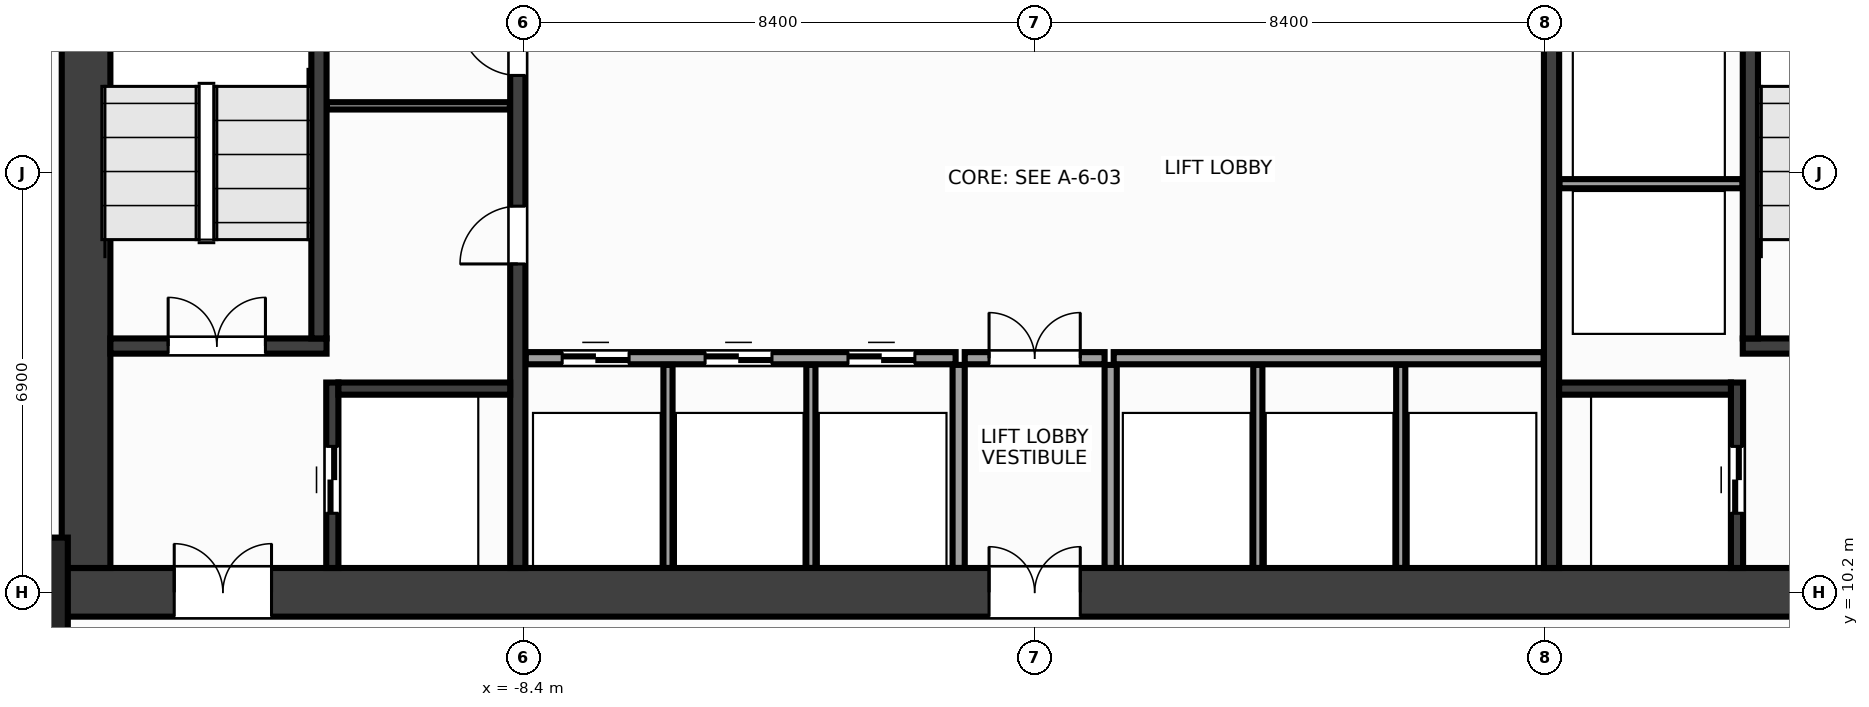
"""IFC4 building model, lengths in metres.
Left out: names, types, materials, properties, quantities, classifications, styles, units other than length and angle.
Written with IfcOpenShell. Run it as: python <this file> out.ifc"""

import sys

from ifc_helpers import new_model, si_unit, direction, frame, frame_2d, origin, origin_2d, place, context, subcontext, project, spatial, rectangle, extrude, source, transform, mapped, element, fill, save


model = new_model("IFC4")
c1 = context("Model", 3, precision=1e-05, world=origin(), true_north=direction((0.0, 1.0)))
c2 = subcontext(c1, "Body", "Model", "MODEL_VIEW")
j1 = project(units=[si_unit("LENGTHUNIT", "METRE"), si_unit("PLANEANGLEUNIT", "RADIAN")], contexts=[c1])
p1 = place(None, origin())
s1 = spatial("IfcSite", under=j1, at=p1, CompositionType="ELEMENT")
p2 = place(p1, origin())
s2 = spatial("IfcBuilding", under=s1, at=p2, CompositionType="ELEMENT")
p3 = place(p2, frame((0.0, 0.0, 56.0)))
s3 = spatial("IfcBuildingStorey", under=s2, at=p3, CompositionType="ELEMENT", Elevation=56.0)
m1 = source(origin(), c2, "Body", "SweptSolid", [
    extrude(rectangle(XDim=32.0, YDim=0.8, at=frame_2d((16.0, 0.0))), origin(), (0.0, 0.0, 1.0), 3.6),
])
p4 = place(p3, frame((-16.0, 10.2, 0.0), z_axis=(0.0, 0.0, 1.0), x_axis=(1.0, 0.0, 0.0)))
e1 = element("IfcWall", 1, at=p4, inside=s3, PredefinedType="SHEAR", context=c2, shape_type="MappedRepresentation", body=[
    mapped(m1, transform((0.0, 0.0, 0.0), x_axis=(1.0, 0.0, 0.0), y_axis=(0.0, 1.0, 0.0), z_axis=(0.0, 0.0, 1.0), scale=1.0)),
])
p5 = place(p4, frame((1.85, 0.0, 0.0)))
e2 = element("IfcOpeningElement", 2, at=p5, cuts=e1, PredefinedType="OPENING", context=c2, shape_type="SweptSolid", body=[
    extrude(rectangle(XDim=1.6, YDim=2.15, at=frame_2d((0.8, 1.075))), frame((0.0, 0.412, 0.0), z_axis=(0.0, -1.0, 0.0), x_axis=(1.0, 0.0, 0.0)), (0.0, 0.0, 1.0), 0.824),
])
p6 = place(p4, frame((28.55, 0.0, 0.0)))
e3 = element("IfcOpeningElement", 3, at=p6, cuts=e1, PredefinedType="OPENING", context=c2, shape_type="SweptSolid", body=[
    extrude(rectangle(XDim=1.6, YDim=2.15, at=frame_2d((0.8, 1.075))), frame((0.0, 0.412, 0.0), z_axis=(0.0, -1.0, 0.0), x_axis=(1.0, 0.0, 0.0)), (0.0, 0.0, 1.0), 0.824),
])
p7 = place(p4, frame((15.25, 0.0, 0.0)))
e4 = element("IfcOpeningElement", 4, at=p7, cuts=e1, PredefinedType="OPENING", context=c2, shape_type="SweptSolid", body=[
    extrude(rectangle(XDim=1.5, YDim=2.2, at=frame_2d((0.75, 1.1))), frame((0.0, 0.412, 0.0), z_axis=(0.0, -1.0, 0.0), x_axis=(1.0, 0.0, 0.0)), (0.0, 0.0, 1.0), 0.824),
])
m2 = source(origin(), c2, "Body", "SweptSolid", [
    extrude(rectangle(XDim=12.8, YDim=0.8, at=frame_2d((6.4, 0.0))), origin(), (0.0, 0.0, 1.0), 3.6),
])
p8 = place(p3, frame((-15.6, 10.6, 0.0), z_axis=(0.0, 0.0, 1.0), x_axis=(0.0, 1.0, 0.0)))
e5 = element("IfcWall", 5, at=p8, inside=s3, PredefinedType="SHEAR", context=c2, shape_type="MappedRepresentation", body=[
    mapped(m2, transform((0.0, 0.0, 0.0), x_axis=(1.0, 0.0, 0.0), y_axis=(0.0, 1.0, 0.0), z_axis=(0.0, 0.0, 1.0), scale=1.0)),
])
m3 = source(origin(), c2, "Body", "SweptSolid", [
    extrude(rectangle(XDim=12.8, YDim=0.25, at=frame_2d((6.4, 0.0))), origin(), (0.0, 0.0, 1.0), 3.6),
])
p9 = place(p3, frame((-8.5, 10.6, 0.0), z_axis=(0.0, 0.0, 1.0), x_axis=(0.0, 1.0, 0.0)))
e6 = element("IfcWall", 6, at=p9, inside=s3, PredefinedType="SHEAR", context=c2, shape_type="MappedRepresentation", body=[
    mapped(m3, transform((0.0, 0.0, 0.0), x_axis=(1.0, 0.0, 0.0), y_axis=(0.0, 1.0, 0.0), z_axis=(0.0, 0.0, 1.0), scale=1.0)),
])
p10 = place(p9, frame((5.0, 0.0, 0.0)))
e7 = element("IfcOpeningElement", 7, at=p10, cuts=e6, PredefinedType="OPENING", context=c2, shape_type="SweptSolid", body=[
    extrude(rectangle(XDim=0.95, YDim=2.15, at=frame_2d((0.475, 1.075))), frame((0.0, 0.137, 0.0), z_axis=(0.0, -1.0, 0.0), x_axis=(1.0, 0.0, 0.0)), (0.0, 0.0, 1.0), 0.274),
])
p11 = place(p9, frame((8.1, 0.0, 0.0)))
e8 = element("IfcOpeningElement", 8, at=p11, cuts=e6, PredefinedType="OPENING", context=c2, shape_type="SweptSolid", body=[
    extrude(rectangle(XDim=0.95, YDim=2.15, at=frame_2d((0.475, 1.075))), frame((0.0, 0.137, 0.0), z_axis=(0.0, -1.0, 0.0), x_axis=(1.0, 0.0, 0.0)), (0.0, 0.0, 1.0), 0.274),
])
p12 = place(p3, frame((8.5, 10.6, 0.0), z_axis=(0.0, 0.0, 1.0), x_axis=(0.0, 1.0, 0.0)))
e9 = element("IfcWall", 9, at=p12, inside=s3, PredefinedType="SHEAR", context=c2, shape_type="MappedRepresentation", body=[
    mapped(m3, transform((0.0, 0.0, 0.0), x_axis=(1.0, 0.0, 0.0), y_axis=(0.0, 1.0, 0.0), z_axis=(0.0, 0.0, 1.0), scale=1.0)),
])
p13 = place(p12, frame((9.85, 0.0, 0.0)))
e10 = element("IfcOpeningElement", 10, at=p13, cuts=e9, PredefinedType="OPENING", context=c2, shape_type="SweptSolid", body=[
    extrude(rectangle(XDim=0.95, YDim=2.15, at=frame_2d((0.475, 1.075))), frame((0.0, 0.137, 0.0), z_axis=(0.0, -1.0, 0.0), x_axis=(1.0, 0.0, 0.0)), (0.0, 0.0, 1.0), 0.274),
])
m4 = source(origin(), c2, "Body", "SweptSolid", [
    extrude(rectangle(XDim=3.555, YDim=0.25, at=frame_2d((1.777, 0.0))), origin(), (0.0, 0.0, 1.0), 3.6),
])
p14 = place(p3, frame((-15.2, 14.25, 0.0), z_axis=(0.0, 0.0, 1.0), x_axis=(1.0, 0.0, 0.0)))
e11 = element("IfcWall", 11, at=p14, inside=s3, PredefinedType="SHEAR", context=c2, shape_type="MappedRepresentation", body=[
    mapped(m4, transform((0.0, 0.0, 0.0), x_axis=(1.0, 0.0, 0.0), y_axis=(0.0, 1.0, 0.0), z_axis=(0.0, 0.0, 1.0), scale=1.0)),
])
p15 = place(p14, frame((0.95, 0.0, 0.0)))
e12 = element("IfcOpeningElement", 12, at=p15, cuts=e11, PredefinedType="OPENING", context=c2, shape_type="SweptSolid", body=[
    extrude(rectangle(XDim=1.6, YDim=2.15, at=frame_2d((0.8, 1.075))), frame((0.0, 0.137, 0.0), z_axis=(0.0, -1.0, 0.0), x_axis=(1.0, 0.0, 0.0)), (0.0, 0.0, 1.0), 0.274),
])
m5 = source(origin(), c2, "Body", "SweptSolid", [
    extrude(rectangle(XDim=9.025, YDim=0.25, at=frame_2d((4.512, 0.0))), origin(), (0.0, 0.0, 1.0), 3.6),
])
p16 = place(p3, frame((-11.77, 14.375, 0.0), z_axis=(0.0, 0.0, 1.0), x_axis=(0.0, 1.0, 0.0)))
e13 = element("IfcWall", 13, at=p16, inside=s3, PredefinedType="SHEAR", context=c2, shape_type="MappedRepresentation", body=[
    mapped(m5, transform((0.0, 0.0, 0.0), x_axis=(1.0, 0.0, 0.0), y_axis=(0.0, 1.0, 0.0), z_axis=(0.0, 0.0, 1.0), scale=1.0)),
])
p17 = place(p3, frame((11.645, 14.25, 0.0), z_axis=(0.0, 0.0, 1.0), x_axis=(1.0, 0.0, 0.0)))
e14 = element("IfcWall", 14, at=p17, inside=s3, PredefinedType="SHEAR", context=c2, shape_type="MappedRepresentation", body=[
    mapped(m4, transform((0.0, 0.0, 0.0), x_axis=(1.0, 0.0, 0.0), y_axis=(0.0, 1.0, 0.0), z_axis=(0.0, 0.0, 1.0), scale=1.0)),
])
p18 = place(p17, frame((0.95, 0.0, 0.0)))
e15 = element("IfcOpeningElement", 15, at=p18, cuts=e14, PredefinedType="OPENING", context=c2, shape_type="SweptSolid", body=[
    extrude(rectangle(XDim=1.6, YDim=2.15, at=frame_2d((0.8, 1.075))), frame((0.0, 0.137, 0.0), z_axis=(0.0, -1.0, 0.0), x_axis=(1.0, 0.0, 0.0)), (0.0, 0.0, 1.0), 0.274),
])
p19 = place(p3, frame((11.77, 14.375, 0.0), z_axis=(0.0, 0.0, 1.0), x_axis=(0.0, 1.0, 0.0)))
e16 = element("IfcWall", 16, at=p19, inside=s3, PredefinedType="SHEAR", context=c2, shape_type="MappedRepresentation", body=[
    mapped(m5, transform((0.0, 0.0, 0.0), x_axis=(1.0, 0.0, 0.0), y_axis=(0.0, 1.0, 0.0), z_axis=(0.0, 0.0, 1.0), scale=1.0)),
])
m6 = source(origin(), c2, "Body", "SweptSolid", [
    extrude(rectangle(XDim=3.05, YDim=0.2, at=frame_2d((1.525, 0.0))), origin(), (0.0, 0.0, 1.0), 3.6),
])
p20 = place(p3, frame((-11.55, 10.6, 0.0), z_axis=(0.0, 0.0, 1.0), x_axis=(0.0, 1.0, 0.0)))
e17 = element("IfcWall", 17, at=p20, inside=s3, PredefinedType="SHEAR", context=c2, shape_type="MappedRepresentation", body=[
    mapped(m6, transform((0.0, 0.0, 0.0), x_axis=(1.0, 0.0, 0.0), y_axis=(0.0, 1.0, 0.0), z_axis=(0.0, 0.0, 1.0), scale=1.0)),
])
p21 = place(p20, frame((0.9, 0.0, 0.0)))
e18 = element("IfcOpeningElement", 18, at=p21, cuts=e17, PredefinedType="OPENING", context=c2, shape_type="SweptSolid", body=[
    extrude(rectangle(XDim=1.1, YDim=2.15, at=frame_2d((0.55, 1.075))), frame((0.0, 0.112, 0.0), z_axis=(0.0, -1.0, 0.0), x_axis=(1.0, 0.0, 0.0)), (0.0, 0.0, 1.0), 0.224),
])
m7 = source(origin(), c2, "Body", "SweptSolid", [
    extrude(rectangle(XDim=2.825, YDim=0.2, at=frame_2d((1.413, 0.0))), origin(), (0.0, 0.0, 1.0), 3.6),
])
p22 = place(p3, frame((-11.45, 13.55, 0.0), z_axis=(0.0, 0.0, 1.0), x_axis=(1.0, 0.0, 0.0)))
e19 = element("IfcWall", 19, at=p22, inside=s3, PredefinedType="SHEAR", context=c2, shape_type="MappedRepresentation", body=[
    mapped(m7, transform((0.0, 0.0, 0.0), x_axis=(1.0, 0.0, 0.0), y_axis=(0.0, 1.0, 0.0), z_axis=(0.0, 0.0, 1.0), scale=1.0)),
])
p23 = place(p3, frame((11.55, 10.6, 0.0), z_axis=(0.0, 0.0, 1.0), x_axis=(0.0, 1.0, 0.0)))
e20 = element("IfcWall", 20, at=p23, inside=s3, PredefinedType="SHEAR", context=c2, shape_type="MappedRepresentation", body=[
    mapped(m6, transform((0.0, 0.0, 0.0), x_axis=(1.0, 0.0, 0.0), y_axis=(0.0, 1.0, 0.0), z_axis=(0.0, 0.0, 1.0), scale=1.0)),
])
p24 = place(p23, frame((0.9, 0.0, 0.0)))
e21 = element("IfcOpeningElement", 21, at=p24, cuts=e20, PredefinedType="OPENING", context=c2, shape_type="SweptSolid", body=[
    extrude(rectangle(XDim=1.1, YDim=2.15, at=frame_2d((0.55, 1.075))), frame((0.0, 0.112, 0.0), z_axis=(0.0, -1.0, 0.0), x_axis=(1.0, 0.0, 0.0)), (0.0, 0.0, 1.0), 0.224),
])
p25 = place(p3, frame((8.625, 13.55, 0.0), z_axis=(0.0, 0.0, 1.0), x_axis=(1.0, 0.0, 0.0)))
e22 = element("IfcWall", 22, at=p25, inside=s3, PredefinedType="SHEAR", context=c2, shape_type="MappedRepresentation", body=[
    mapped(m7, transform((0.0, 0.0, 0.0), x_axis=(1.0, 0.0, 0.0), y_axis=(0.0, 1.0, 0.0), z_axis=(0.0, 0.0, 1.0), scale=1.0)),
])
m8 = source(origin(), c2, "Body", "SweptSolid", [
    extrude(rectangle(XDim=1.8, YDim=1.8, at=origin_2d()), origin(), (0.0, 0.0, 1.0), 3.6),
])
p26 = place(p3, frame((-16.8, 10.2, 0.0), z_axis=(0.0, 0.0, 1.0), x_axis=(1.0, 0.0, 0.0)))
e23 = element("IfcColumn", 23, at=p26, inside=s3, PredefinedType="COLUMN", context=c2, shape_type="MappedRepresentation", body=[
    mapped(m8, transform((0.0, 0.0, 0.0), x_axis=(1.0, 0.0, 0.0), y_axis=(0.0, 1.0, 0.0), z_axis=(0.0, 0.0, 1.0), scale=1.0)),
])
m9 = source(origin(), c2, "Body", "SweptSolid", [
    extrude(rectangle(XDim=3.01, YDim=0.12, at=frame_2d((1.505, 0.0))), origin(), (0.0, 0.0, 1.0), 3.36),
])
p27 = place(p3, frame((-11.64, 18.2, 0.0), z_axis=(0.0, 0.0, 1.0), x_axis=(1.0, 0.0, 0.0)))
e24 = element("IfcWall", 24, at=p27, inside=s3, PredefinedType="PARTITIONING", context=c2, shape_type="MappedRepresentation", body=[
    mapped(m9, transform((0.0, 0.0, 0.0), x_axis=(1.0, 0.0, 0.0), y_axis=(0.0, 1.0, 0.0), z_axis=(0.0, 0.0, 1.0), scale=1.0)),
])
m10 = source(origin(), c2, "Body", "SweptSolid", [
    extrude(rectangle(XDim=3.01, YDim=0.15, at=frame_2d((1.505, 0.0))), origin(), (0.0, 0.0, 1.0), 3.36),
])
p28 = place(p3, frame((8.63, 16.92, 0.0), z_axis=(0.0, 0.0, 1.0), x_axis=(1.0, 0.0, 0.0)))
e25 = element("IfcWall", 25, at=p28, inside=s3, PredefinedType="PARTITIONING", context=c2, shape_type="MappedRepresentation", body=[
    mapped(m10, transform((0.0, 0.0, 0.0), x_axis=(1.0, 0.0, 0.0), y_axis=(0.0, 1.0, 0.0), z_axis=(0.0, 0.0, 1.0), scale=1.0)),
])
m11 = source(origin(), c2, "Body", "SweptSolid", [
    extrude(rectangle(XDim=7.07, YDim=0.2, at=frame_2d((3.535, 0.0))), origin(), (0.0, 0.0, 1.0), 3.36),
])
p29 = place(p3, frame((-8.37, 14.05, 0.0), z_axis=(0.0, 0.0, 1.0), x_axis=(1.0, 0.0, 0.0)))
e26 = element("IfcWall", 26, at=p29, inside=s3, PredefinedType="PARTITIONING", context=c2, shape_type="MappedRepresentation", body=[
    mapped(m11, transform((0.0, 0.0, 0.0), x_axis=(1.0, 0.0, 0.0), y_axis=(0.0, 1.0, 0.0), z_axis=(0.0, 0.0, 1.0), scale=1.0)),
])
p30 = place(p29, frame((0.6, 0.0, 0.0)))
e27 = element("IfcOpeningElement", 27, at=p30, cuts=e26, PredefinedType="OPENING", context=c2, shape_type="SweptSolid", body=[
    extrude(rectangle(XDim=1.1, YDim=2.15, at=frame_2d((0.55, 1.075))), frame((0.0, 0.112, 0.0), z_axis=(0.0, -1.0, 0.0), x_axis=(1.0, 0.0, 0.0)), (0.0, 0.0, 1.0), 0.224),
])
p31 = place(p29, frame((2.95, 0.0, 0.0)))
e28 = element("IfcOpeningElement", 28, at=p31, cuts=e26, PredefinedType="OPENING", context=c2, shape_type="SweptSolid", body=[
    extrude(rectangle(XDim=1.1, YDim=2.15, at=frame_2d((0.55, 1.075))), frame((0.0, 0.112, 0.0), z_axis=(0.0, -1.0, 0.0), x_axis=(1.0, 0.0, 0.0)), (0.0, 0.0, 1.0), 0.224),
])
p32 = place(p29, frame((5.3, 0.0, 0.0)))
e29 = element("IfcOpeningElement", 29, at=p32, cuts=e26, PredefinedType="OPENING", context=c2, shape_type="SweptSolid", body=[
    extrude(rectangle(XDim=1.1, YDim=2.15, at=frame_2d((0.55, 1.075))), frame((0.0, 0.112, 0.0), z_axis=(0.0, -1.0, 0.0), x_axis=(1.0, 0.0, 0.0)), (0.0, 0.0, 1.0), 0.224),
])
p33 = place(p3, frame((1.3, 14.05, 0.0), z_axis=(0.0, 0.0, 1.0), x_axis=(1.0, 0.0, 0.0)))
e30 = element("IfcWall", 30, at=p33, inside=s3, PredefinedType="PARTITIONING", context=c2, shape_type="MappedRepresentation", body=[
    mapped(m11, transform((0.0, 0.0, 0.0), x_axis=(1.0, 0.0, 0.0), y_axis=(0.0, 1.0, 0.0), z_axis=(0.0, 0.0, 1.0), scale=1.0)),
])
m12 = source(origin(), c2, "Body", "SweptSolid", [
    extrude(rectangle(XDim=3.34, YDim=0.2, at=frame_2d((1.67, 0.0))), origin(), (0.0, 0.0, 1.0), 3.36),
])
for number, where, z_axis, x_axis in (
    (31, (-1.25, 10.6, 0.0), (0.0, 0.0, 1.0), (0.0, 1.0, 0.0)),
    (32, (1.25, 10.6, 0.0), (0.0, 0.0, 1.0), (0.0, 1.0, 0.0)),
):
    element("IfcWall", number, at=place(p3, frame(where, z_axis=z_axis, x_axis=x_axis)), inside=s3, PredefinedType="PARTITIONING", context=c2, shape_type="MappedRepresentation", body=[
        mapped(m12, transform((0.0, 0.0, 0.0), x_axis=(1.0, 0.0, 0.0), y_axis=(0.0, 1.0, 0.0), z_axis=(0.0, 0.0, 1.0), scale=1.0)),
    ])
m13 = source(origin(), c2, "Body", "SweptSolid", [
    extrude(rectangle(XDim=2.3, YDim=0.2, at=frame_2d((1.15, 0.0))), origin(), (0.0, 0.0, 1.0), 3.36),
])
p34 = place(p3, frame((-1.15, 14.05, 0.0), z_axis=(0.0, 0.0, 1.0), x_axis=(1.0, 0.0, 0.0)))
e33 = element("IfcWall", 33, at=p34, inside=s3, PredefinedType="PARTITIONING", context=c2, shape_type="MappedRepresentation", body=[
    mapped(m13, transform((0.0, 0.0, 0.0), x_axis=(1.0, 0.0, 0.0), y_axis=(0.0, 1.0, 0.0), z_axis=(0.0, 0.0, 1.0), scale=1.0)),
])
p35 = place(p34, frame((0.4, 0.0, 0.0)))
e34 = element("IfcOpeningElement", 34, at=p35, cuts=e33, PredefinedType="OPENING", context=c2, shape_type="SweptSolid", body=[
    extrude(rectangle(XDim=1.5, YDim=2.2, at=frame_2d((0.75, 1.1))), frame((0.0, 0.112, 0.0), z_axis=(0.0, -1.0, 0.0), x_axis=(1.0, 0.0, 0.0)), (0.0, 0.0, 1.0), 0.224),
])
m14 = source(origin(), c2, "Body", "SweptSolid", [
    extrude(rectangle(XDim=3.34, YDim=0.15, at=frame_2d((1.67, 0.0))), origin(), (0.0, 0.0, 1.0), 3.36),
])
for number, where, z_axis, x_axis in (
    (35, (-6.03, 10.6, 0.0), (0.0, 0.0, 1.0), (0.0, 1.0, 0.0)),
    (36, (-3.68, 10.6, 0.0), (0.0, 0.0, 1.0), (0.0, 1.0, 0.0)),
    (37, (3.67, 10.6, 0.0), (0.0, 0.0, 1.0), (0.0, 1.0, 0.0)),
    (38, (6.02, 10.6, 0.0), (0.0, 0.0, 1.0), (0.0, 1.0, 0.0)),
):
    element("IfcWall", number, at=place(p3, frame(where, z_axis=z_axis, x_axis=x_axis)), inside=s3, PredefinedType="PARTITIONING", context=c2, shape_type="MappedRepresentation", body=[
        mapped(m14, transform((0.0, 0.0, 0.0), x_axis=(1.0, 0.0, 0.0), y_axis=(0.0, 1.0, 0.0), z_axis=(0.0, 0.0, 1.0), scale=1.0)),
    ])
m15 = source(origin(), c2, "Body", "SweptSolid", [
    extrude(rectangle(XDim=1.6, YDim=2.15, at=frame_2d((0.8, 1.075))), frame((0.0, 0.025, 0.0), z_axis=(0.0, -1.0, 0.0), x_axis=(1.0, 0.0, 0.0)), (0.0, 0.0, 1.0), 0.05),
])
p36 = place(p15, origin())
e39 = element("IfcDoor", 39, at=p36, inside=s3, OperationType="DOUBLE_DOOR_SINGLE_SWING", PredefinedType="DOOR", context=c2, shape_type="MappedRepresentation", body=[
    mapped(m15, transform((0.0, 0.0, 0.0), x_axis=(1.0, 0.0, 0.0), y_axis=(0.0, 1.0, 0.0), z_axis=(0.0, 0.0, 1.0), scale=1.0)),
])
fill(e12, e39)
p37 = place(p5, origin())
e40 = element("IfcDoor", 40, at=p37, inside=s3, OperationType="DOUBLE_DOOR_SINGLE_SWING", PredefinedType="DOOR", context=c2, shape_type="MappedRepresentation", body=[
    mapped(m15, transform((0.0, 0.0, 0.0), x_axis=(1.0, 0.0, 0.0), y_axis=(0.0, 1.0, 0.0), z_axis=(0.0, 0.0, 1.0), scale=1.0)),
])
fill(e2, e40)
m16 = source(origin(), c2, "Body", "SweptSolid", [
    extrude(rectangle(XDim=1.1, YDim=2.15, at=frame_2d((0.55, 1.075))), frame((0.0, 0.025, 0.0), z_axis=(0.0, -1.0, 0.0), x_axis=(1.0, 0.0, 0.0)), (0.0, 0.0, 1.0), 0.05),
])
p38 = place(p21, origin())
e41 = element("IfcDoor", 41, at=p38, inside=s3, OperationType="DOUBLE_DOOR_SLIDING", PredefinedType="DOOR", context=c2, shape_type="MappedRepresentation", body=[
    mapped(m16, transform((0.0, 0.0, 0.0), x_axis=(1.0, 0.0, 0.0), y_axis=(0.0, 1.0, 0.0), z_axis=(0.0, 0.0, 1.0), scale=1.0)),
])
fill(e18, e41)
p39 = place(p24, origin())
e42 = element("IfcDoor", 42, at=p39, inside=s3, OperationType="DOUBLE_DOOR_SLIDING", PredefinedType="DOOR", context=c2, shape_type="MappedRepresentation", body=[
    mapped(m16, transform((0.0, 0.0, 0.0), x_axis=(1.0, 0.0, 0.0), y_axis=(0.0, 1.0, 0.0), z_axis=(0.0, 0.0, 1.0), scale=1.0)),
])
fill(e21, e42)
m17 = source(origin(), c2, "Body", "SweptSolid", [
    extrude(rectangle(XDim=0.95, YDim=2.15, at=frame_2d((0.475, 1.075))), frame((0.0, 0.025, 0.0), z_axis=(0.0, -1.0, 0.0), x_axis=(1.0, 0.0, 0.0)), (0.0, 0.0, 1.0), 0.05),
])
p40 = place(p10, origin())
e43 = element("IfcDoor", 43, at=p40, inside=s3, OperationType="SINGLE_SWING_LEFT", PredefinedType="DOOR", context=c2, shape_type="MappedRepresentation", body=[
    mapped(m17, transform((0.0, 0.0, 0.0), x_axis=(1.0, 0.0, 0.0), y_axis=(0.0, 1.0, 0.0), z_axis=(0.0, 0.0, 1.0), scale=1.0)),
])
fill(e7, e43)
p41 = place(p11, origin())
e44 = element("IfcDoor", 44, at=p41, inside=s3, OperationType="SINGLE_SWING_RIGHT", PredefinedType="DOOR", context=c2, shape_type="MappedRepresentation", body=[
    mapped(m17, transform((0.0, 0.0, 0.0), x_axis=(1.0, 0.0, 0.0), y_axis=(0.0, 1.0, 0.0), z_axis=(0.0, 0.0, 1.0), scale=1.0)),
])
fill(e8, e44)
p42 = place(p30, origin())
e45 = element("IfcDoor", 45, at=p42, inside=s3, OperationType="DOUBLE_DOOR_SLIDING", PredefinedType="DOOR", context=c2, shape_type="MappedRepresentation", body=[
    mapped(m16, transform((0.0, 0.0, 0.0), x_axis=(1.0, 0.0, 0.0), y_axis=(0.0, 1.0, 0.0), z_axis=(0.0, 0.0, 1.0), scale=1.0)),
])
fill(e27, e45)
p43 = place(p31, origin())
e46 = element("IfcDoor", 46, at=p43, inside=s3, OperationType="DOUBLE_DOOR_SLIDING", PredefinedType="DOOR", context=c2, shape_type="MappedRepresentation", body=[
    mapped(m16, transform((0.0, 0.0, 0.0), x_axis=(1.0, 0.0, 0.0), y_axis=(0.0, 1.0, 0.0), z_axis=(0.0, 0.0, 1.0), scale=1.0)),
])
fill(e28, e46)
p44 = place(p32, origin())
e47 = element("IfcDoor", 47, at=p44, inside=s3, OperationType="DOUBLE_DOOR_SLIDING", PredefinedType="DOOR", context=c2, shape_type="MappedRepresentation", body=[
    mapped(m16, transform((0.0, 0.0, 0.0), x_axis=(1.0, 0.0, 0.0), y_axis=(0.0, 1.0, 0.0), z_axis=(0.0, 0.0, 1.0), scale=1.0)),
])
fill(e29, e47)
m18 = source(origin(), c2, "Body", "SweptSolid", [
    extrude(rectangle(XDim=1.5, YDim=2.2, at=frame_2d((0.75, 1.1))), frame((0.0, 0.025, 0.0), z_axis=(0.0, -1.0, 0.0), x_axis=(1.0, 0.0, 0.0)), (0.0, 0.0, 1.0), 0.05),
])
p45 = place(p35, origin())
e48 = element("IfcDoor", 48, at=p45, inside=s3, OperationType="DOUBLE_DOOR_SINGLE_SWING", PredefinedType="DOOR", context=c2, shape_type="MappedRepresentation", body=[
    mapped(m18, transform((0.0, 0.0, 0.0), x_axis=(1.0, 0.0, 0.0), y_axis=(0.0, 1.0, 0.0), z_axis=(0.0, 0.0, 1.0), scale=1.0)),
])
fill(e34, e48)
p46 = place(p7, origin())
e49 = element("IfcDoor", 49, at=p46, inside=s3, OperationType="DOUBLE_DOOR_SINGLE_SWING", PredefinedType="DOOR", context=c2, shape_type="MappedRepresentation", body=[
    mapped(m18, transform((0.0, 0.0, 0.0), x_axis=(1.0, 0.0, 0.0), y_axis=(0.0, 1.0, 0.0), z_axis=(0.0, 0.0, 1.0), scale=1.0)),
])
fill(e4, e49)
save(model, sys.argv[1])
